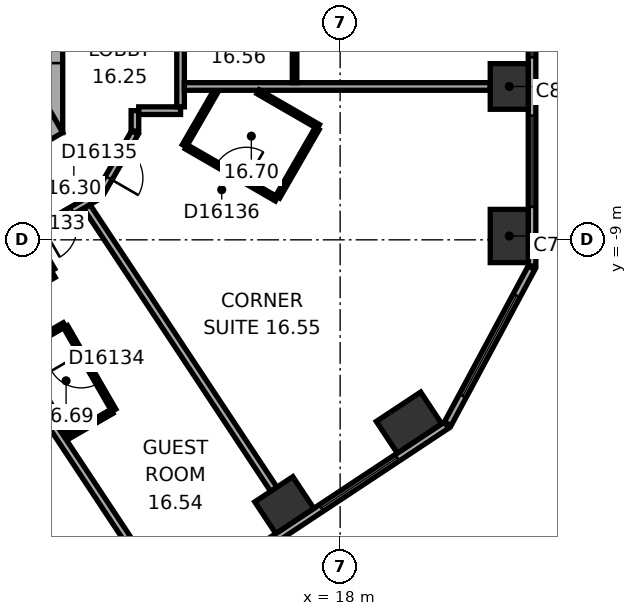
"""IFC4 building model, lengths in metres.
Left out: names, types, materials, properties, quantities, classifications, styles, units other than length and angle.
Written with IfcOpenShell. Run it as: python <this file> out.ifc"""

import sys

from ifc_helpers import new_model, si_unit, direction, frame, frame_2d, origin, origin_2d, place, context, subcontext, project, spatial, rectangle, extrude, element, fill, save


model = new_model("IFC4")
c1 = context("Model", 3, precision=1e-05, world=origin(), true_north=direction((0.0, 1.0)))
c2 = subcontext(c1, "Body", "Model", "MODEL_VIEW")
j1 = project(units=[si_unit("LENGTHUNIT", "METRE"), si_unit("PLANEANGLEUNIT", "RADIAN")], contexts=[c1])
p1 = place(None, origin())
s1 = spatial("IfcSite", under=j1, at=p1, CompositionType="ELEMENT")
p2 = place(p1, origin())
s2 = spatial("IfcBuilding", under=s1, at=p2, CompositionType="ELEMENT")
p3 = place(p2, frame((0.0, 0.0, 73.7)))
s3 = spatial("IfcBuildingStorey", under=s2, at=p3, CompositionType="ELEMENT", Elevation=73.7)
p4 = place(p3, frame((22.45, -8.899, 0.0), z_axis=(0.0, 0.0, 1.0), x_axis=(0.0, 1.0, 0.0)))
e1 = element("IfcColumn", 1, at=p4, inside=s3, PredefinedType="COLUMN", context=c2, shape_type="SweptSolid", body=[
    extrude(rectangle(XDim=1.4, YDim=1.0, at=origin_2d()), origin(), (0.0, 0.0, 1.0), 3.3),
])
for number, where, z_axis, x_axis in (
    (2, (22.45, -4.965, 0.0), (0.0, 0.0, 1.0), (0.0, 1.0, 0.0)),
    (3, (16.531, -15.981, 0.0), (0.0, 0.0, 1.0), (0.834, 0.552, 0.0)),
):
    element("IfcColumn", number, at=place(p3, frame(where, z_axis=z_axis, x_axis=x_axis)), inside=s3, PredefinedType="COLUMN", context=c2, shape_type="SweptSolid", body=[
        extrude(rectangle(XDim=1.2, YDim=1.0, at=origin_2d()), origin(), (0.0, 0.0, 1.0), 3.3),
    ])
p5 = place(p3, frame((19.812, -13.809, 0.0), z_axis=(0.0, 0.0, 1.0), x_axis=(0.833885822067, 0.551936985312, 0.0)))
e4 = element("IfcColumn", 4, at=p5, inside=s3, PredefinedType="COLUMN", context=c2, shape_type="SweptSolid", body=[
    extrude(rectangle(XDim=1.4, YDim=1.0, at=origin_2d()), origin(), (0.0, 0.0, 1.0), 3.3),
])
p6 = place(p3, frame((10.1, -6.177, 0.0), z_axis=(0.0, 0.0, 1.0), x_axis=(0.0, 1.0, 0.0)))
e5 = element("IfcWall", 5, at=p6, inside=s3, PredefinedType="SHEAR", context=c2, shape_type="SweptSolid", body=[
    extrude(rectangle(XDim=12.355, YDim=1.2, at=frame_2d((6.177, 0.0))), origin(), (0.0, 0.0, 1.0), 3.3),
])
p7 = place(p6, frame((6.378, 0.0, 0.0)))
e6 = element("IfcOpeningElement", 6, at=p7, cuts=e5, PredefinedType="OPENING", context=c2, shape_type="SweptSolid", body=[
    extrude(rectangle(XDim=1.5, YDim=2.1, at=frame_2d((0.75, 1.05))), frame((0.0, 0.61, 0.0), z_axis=(0.0, -1.0, 0.0), x_axis=(1.0, 0.0, 0.0)), (0.0, 0.0, 1.0), 1.22),
])
p8 = place(p6, frame((1.828, 0.0, 0.0)))
e7 = element("IfcOpeningElement", 7, at=p8, cuts=e5, PredefinedType="OPENING", context=c2, shape_type="SweptSolid", body=[
    extrude(rectangle(XDim=1.1, YDim=2.1, at=frame_2d((0.55, 1.05))), frame((0.0, 0.61, 0.0), z_axis=(0.0, -1.0, 0.0), x_axis=(1.0, 0.0, 0.0)), (0.0, 0.0, 1.0), 1.22),
])
p9 = place(p6, frame((4.427, 0.0, 0.0)))
e8 = element("IfcOpeningElement", 8, at=p9, cuts=e5, PredefinedType="OPENING", context=c2, shape_type="SweptSolid", body=[
    extrude(rectangle(XDim=1.1, YDim=2.1, at=frame_2d((0.55, 1.05))), frame((0.0, 0.61, 0.0), z_axis=(0.0, -1.0, 0.0), x_axis=(1.0, 0.0, 0.0)), (0.0, 0.0, 1.0), 1.22),
])
p10 = place(p3, frame((-0.3, -11.836, 0.0), z_axis=(0.0, 0.0, 1.0), x_axis=(0.866021384402, 0.500006961711, 0.0)))
e9 = element("IfcWall", 9, at=p10, inside=s3, PredefinedType="SHEAR", context=c2, shape_type="SweptSolid", body=[
    extrude(rectangle(XDim=12.355, YDim=1.2, at=frame_2d((6.178, 0.0))), origin(), (0.0, 0.0, 1.0), 3.3),
])
p11 = place(p10, frame((2.828, 0.0, 0.0)))
e10 = element("IfcOpeningElement", 10, at=p11, cuts=e9, PredefinedType="OPENING", context=c2, shape_type="SweptSolid", body=[
    extrude(rectangle(XDim=0.9, YDim=2.1, at=frame_2d((0.45, 1.05))), frame((0.0, 0.61, 0.0), z_axis=(0.0, -1.0, 0.0), x_axis=(1.0, 0.0, 0.0)), (0.0, 0.0, 1.0), 1.22),
])
p12 = place(p10, frame((5.428, 0.0, 0.0)))
e11 = element("IfcOpeningElement", 11, at=p12, cuts=e9, PredefinedType="OPENING", context=c2, shape_type="SweptSolid", body=[
    extrude(rectangle(XDim=0.9, YDim=2.1, at=frame_2d((0.45, 1.05))), frame((0.0, 0.61, 0.0), z_axis=(0.0, -1.0, 0.0), x_axis=(1.0, 0.0, 0.0)), (0.0, 0.0, 1.0), 1.22),
])
p13 = place(p10, frame((7.928, 0.0, 0.0)))
e12 = element("IfcOpeningElement", 12, at=p13, cuts=e9, PredefinedType="OPENING", context=c2, shape_type="SweptSolid", body=[
    extrude(rectangle(XDim=1.1, YDim=2.1, at=frame_2d((0.55, 1.05))), frame((0.0, 0.61, 0.0), z_axis=(0.0, -1.0, 0.0), x_axis=(1.0, 0.0, 0.0)), (0.0, 0.0, 1.0), 1.22),
])
p14 = place(p3, frame((23.05, -9.687, 0.0), z_axis=(0.0, 0.0, 1.0), x_axis=(0.0, 1.0, 0.0)))
e13 = element("IfcWall", 13, at=p14, inside=s3, PredefinedType="STANDARD", context=c2, shape_type="SweptSolid", body=[
    extrude(rectangle(XDim=21.246, YDim=0.2, at=frame_2d((10.623, 0.0))), origin(), (0.0, 0.0, 1.0), 3.3),
])
p15 = place(p14, frame((1.555, 0.0, 0.8)))
e14 = element("IfcOpeningElement", 14, at=p15, cuts=e13, PredefinedType="OPENING", context=c2, shape_type="SweptSolid", body=[
    extrude(rectangle(XDim=2.4, YDim=1.7, at=frame_2d((1.2, 0.85))), frame((0.0, 0.11, 0.0), z_axis=(0.0, -1.0, 0.0), x_axis=(1.0, 0.0, 0.0)), (0.0, 0.0, 1.0), 0.22),
])
p16 = place(p14, frame((5.489, 0.0, 0.8)))
e15 = element("IfcOpeningElement", 15, at=p16, cuts=e13, PredefinedType="OPENING", context=c2, shape_type="SweptSolid", body=[
    extrude(rectangle(XDim=2.4, YDim=1.7, at=frame_2d((1.2, 0.85))), frame((0.0, 0.11, 0.0), z_axis=(0.0, -1.0, 0.0), x_axis=(1.0, 0.0, 0.0)), (0.0, 0.0, 1.0), 0.22),
])
p17 = place(p14, frame((9.424, 0.0, 0.8)))
e16 = element("IfcOpeningElement", 16, at=p17, cuts=e13, PredefinedType="OPENING", context=c2, shape_type="SweptSolid", body=[
    extrude(rectangle(XDim=2.4, YDim=1.7, at=frame_2d((1.2, 0.85))), frame((0.0, 0.11, 0.0), z_axis=(0.0, -1.0, 0.0), x_axis=(1.0, 0.0, 0.0)), (0.0, 0.0, 1.0), 0.22),
])
p18 = place(p14, frame((13.358, 0.0, 0.8)))
e17 = element("IfcOpeningElement", 17, at=p18, cuts=e13, PredefinedType="OPENING", context=c2, shape_type="SweptSolid", body=[
    extrude(rectangle(XDim=2.4, YDim=1.7, at=frame_2d((1.2, 0.85))), frame((0.0, 0.11, 0.0), z_axis=(0.0, -1.0, 0.0), x_axis=(1.0, 0.0, 0.0)), (0.0, 0.0, 1.0), 0.22),
])
p19 = place(p14, frame((17.293, 0.0, 0.8)))
e18 = element("IfcOpeningElement", 18, at=p19, cuts=e13, PredefinedType="OPENING", context=c2, shape_type="SweptSolid", body=[
    extrude(rectangle(XDim=2.4, YDim=1.7, at=frame_2d((1.2, 0.85))), frame((0.0, 0.11, 0.0), z_axis=(0.0, -1.0, 0.0), x_axis=(1.0, 0.0, 0.0)), (0.0, 0.0, 1.0), 0.22),
])
p20 = place(p3, frame((3.083, -25.601, 0.0), z_axis=(0.0, 0.0, 1.0), x_axis=(0.833884295743, 0.551939291329, 0.0)))
e19 = element("IfcWall", 19, at=p20, inside=s3, PredefinedType="STANDARD", context=c2, shape_type="SweptSolid", body=[
    extrude(rectangle(XDim=21.246, YDim=0.2, at=frame_2d((10.623, 0.0))), origin(), (0.0, 0.0, 1.0), 3.3),
])
p21 = place(p20, frame((1.553, 0.0, 0.8)))
e20 = element("IfcOpeningElement", 20, at=p21, cuts=e19, PredefinedType="OPENING", context=c2, shape_type="SweptSolid", body=[
    extrude(rectangle(XDim=2.4, YDim=1.7, at=frame_2d((1.2, 0.85))), frame((0.0, 0.11, 0.0), z_axis=(0.0, -1.0, 0.0), x_axis=(1.0, 0.0, 0.0)), (0.0, 0.0, 1.0), 0.22),
])
p22 = place(p20, frame((5.488, 0.0, 0.8)))
e21 = element("IfcOpeningElement", 21, at=p22, cuts=e19, PredefinedType="OPENING", context=c2, shape_type="SweptSolid", body=[
    extrude(rectangle(XDim=2.4, YDim=1.7, at=frame_2d((1.2, 0.85))), frame((0.0, 0.11, 0.0), z_axis=(0.0, -1.0, 0.0), x_axis=(1.0, 0.0, 0.0)), (0.0, 0.0, 1.0), 0.22),
])
p23 = place(p20, frame((9.422, 0.0, 0.8)))
e22 = element("IfcOpeningElement", 22, at=p23, cuts=e19, PredefinedType="OPENING", context=c2, shape_type="SweptSolid", body=[
    extrude(rectangle(XDim=2.4, YDim=1.7, at=frame_2d((1.2, 0.85))), frame((0.0, 0.11, 0.0), z_axis=(0.0, -1.0, 0.0), x_axis=(1.0, 0.0, 0.0)), (0.0, 0.0, 1.0), 0.22),
])
p24 = place(p20, frame((13.357, 0.0, 0.8)))
e23 = element("IfcOpeningElement", 23, at=p24, cuts=e19, PredefinedType="OPENING", context=c2, shape_type="SweptSolid", body=[
    extrude(rectangle(XDim=2.4, YDim=1.7, at=frame_2d((1.2, 0.85))), frame((0.0, 0.11, 0.0), z_axis=(0.0, -1.0, 0.0), x_axis=(1.0, 0.0, 0.0)), (0.0, 0.0, 1.0), 0.22),
])
p25 = place(p20, frame((17.291, 0.0, 0.8)))
e24 = element("IfcOpeningElement", 24, at=p25, cuts=e19, PredefinedType="OPENING", context=c2, shape_type="SweptSolid", body=[
    extrude(rectangle(XDim=2.4, YDim=1.7, at=frame_2d((1.2, 0.85))), frame((0.0, 0.11, 0.0), z_axis=(0.0, -1.0, 0.0), x_axis=(1.0, 0.0, 0.0)), (0.0, 0.0, 1.0), 0.22),
])
p26 = place(p3, frame((20.833, -13.839, 0.0), z_axis=(0.0, 0.0, 1.0), x_axis=(0.473321668581, 0.880889662813, 0.0)))
e25 = element("IfcWall", 25, at=p26, inside=s3, PredefinedType="STANDARD", context=c2, shape_type="SweptSolid", body=[
    extrude(rectangle(XDim=4.66, YDim=0.2, at=frame_2d((2.33, 0.0))), origin(), (0.0, 0.0, 1.0), 3.3),
])
p27 = place(p26, frame((0.83, 0.0, 0.8)))
e26 = element("IfcOpeningElement", 26, at=p27, cuts=e25, PredefinedType="OPENING", context=c2, shape_type="SweptSolid", body=[
    extrude(rectangle(XDim=3.0, YDim=1.7, at=frame_2d((1.5, 0.85))), frame((0.0, 0.11, 0.0), z_axis=(0.0, -1.0, 0.0), x_axis=(1.0, 0.0, 0.0)), (0.0, 0.0, 1.0), 0.22),
])
p28 = place(p3, frame((7.419, -11.653, 0.0), z_axis=(0.0, 0.0, 1.0), x_axis=(0.866038154057, 0.49997791523, 0.0)))
e27 = element("IfcWall", 27, at=p28, inside=s3, PredefinedType="PARTITIONING", context=c2, shape_type="SweptSolid", body=[
    extrude(rectangle(XDim=3.502, YDim=0.2, at=frame_2d((1.751, 0.0))), origin(), (0.0, 0.0, 1.0), 2.95),
])
p29 = place(p3, frame((9.532, -11.934, 0.0), z_axis=(0.0, 0.0, 1.0), x_axis=(0.866034573852, 0.49998411664, 0.0)))
e28 = element("IfcWall", 28, at=p29, inside=s3, PredefinedType="PARTITIONING", context=c2, shape_type="SweptSolid", body=[
    extrude(rectangle(XDim=1.4, YDim=0.12, at=frame_2d((0.7, 0.0))), origin(), (0.0, 0.0, 1.0), 2.95),
])
p30 = place(p3, frame((9.852, -8.861, 0.0), z_axis=(0.0, 0.0, 1.0), x_axis=(0.866013291437, 0.500020978615, 0.0)))
e29 = element("IfcWall", 29, at=p30, inside=s3, PredefinedType="PARTITIONING", context=c2, shape_type="SweptSolid", body=[
    extrude(rectangle(XDim=2.077, YDim=0.2, at=frame_2d((1.038, 0.0))), origin(), (0.0, 0.0, 1.0), 2.95),
])
p31 = place(p30, frame((0.372, 0.0, 0.0)))
e30 = element("IfcOpeningElement", 30, at=p31, cuts=e29, PredefinedType="OPENING", context=c2, shape_type="SweptSolid", body=[
    extrude(rectangle(XDim=0.9, YDim=2.1, at=frame_2d((0.45, 1.05))), frame((0.0, 0.11, 0.0), z_axis=(0.0, -1.0, 0.0), x_axis=(1.0, 0.0, 0.0)), (0.0, 0.0, 1.0), 0.22),
])
p32 = place(p3, frame((10.402, -9.815, 0.0), z_axis=(0.0, 0.0, 1.0), x_axis=(-0.499968756647, 0.866043441391, 0.0)))
e31 = element("IfcWall", 31, at=p32, inside=s3, PredefinedType="PARTITIONING", context=c2, shape_type="SweptSolid", body=[
    extrude(rectangle(XDim=1.001, YDim=0.2, at=frame_2d((0.5, 0.0))), origin(), (0.0, 0.0, 1.0), 2.95),
])
p33 = place(p3, frame((10.775, -11.286, 0.0), z_axis=(0.0, 0.0, 1.0), x_axis=(0.500046963369, -0.865998287773, 0.0)))
e32 = element("IfcWall", 32, at=p33, inside=s3, PredefinedType="PARTITIONING", context=c2, shape_type="SweptSolid", body=[
    extrude(rectangle(XDim=2.54, YDim=0.12, at=frame_2d((1.27, 0.0))), origin(), (0.0, 0.0, 1.0), 2.95),
])
p34 = place(p33, frame((0.82, 0.0, 0.0)))
e33 = element("IfcOpeningElement", 33, at=p34, cuts=e32, PredefinedType="OPENING", context=c2, shape_type="SweptSolid", body=[
    extrude(rectangle(XDim=0.9, YDim=2.1, at=frame_2d((0.45, 1.05))), frame((0.0, 0.07, 0.0), z_axis=(0.0, -1.0, 0.0), x_axis=(1.0, 0.0, 0.0)), (0.0, 0.0, 1.0), 0.14),
])
p35 = place(p3, frame((10.833, -14.185, 0.0), z_axis=(0.0, 0.0, 1.0), x_axis=(-0.500005339912, 0.866022320763, 0.0)))
e34 = element("IfcWall", 34, at=p35, inside=s3, PredefinedType="PARTITIONING", context=c2, shape_type="SweptSolid", body=[
    extrude(rectangle(XDim=2.54, YDim=0.12, at=frame_2d((1.27, 0.0))), origin(), (0.0, 0.0, 1.0), 2.95),
])
p36 = place(p3, frame((11.67, -7.788, 0.0), z_axis=(0.0, 0.0, 1.0), x_axis=(0.500063286585, 0.865988862174, 0.0)))
e35 = element("IfcWall", 35, at=p36, inside=s3, PredefinedType="PARTITIONING", context=c2, shape_type="SweptSolid", body=[
    extrude(rectangle(XDim=1.86, YDim=0.2, at=frame_2d((0.93, 0.0))), origin(), (0.0, 0.0, 1.0), 2.95),
])
p37 = place(p36, frame((0.48, 0.0, 0.0)))
e36 = element("IfcOpeningElement", 36, at=p37, cuts=e35, PredefinedType="OPENING", context=c2, shape_type="SweptSolid", body=[
    extrude(rectangle(XDim=0.9, YDim=2.1, at=frame_2d((0.45, 1.05))), frame((0.0, 0.11, 0.0), z_axis=(0.0, -1.0, 0.0), x_axis=(1.0, 0.0, 0.0)), (0.0, 0.0, 1.0), 0.22),
])
p38 = place(p3, frame((11.993, -13.515, 0.0), z_axis=(0.0, 0.0, 1.0), x_axis=(-0.865956862152, -0.500118698802, 0.0)))
e37 = element("IfcWall", 37, at=p38, inside=s3, PredefinedType="PARTITIONING", context=c2, shape_type="SweptSolid", body=[
    extrude(rectangle(XDim=1.28, YDim=0.12, at=frame_2d((0.64, 0.0))), origin(), (0.0, 0.0, 1.0), 2.95),
])
p39 = place(p3, frame((12.6, -6.138, 0.0), z_axis=(0.0, 0.0, 1.0), x_axis=(0.0, 1.0, 0.0)))
e38 = element("IfcWall", 38, at=p39, inside=s3, PredefinedType="PARTITIONING", context=c2, shape_type="SweptSolid", body=[
    extrude(rectangle(XDim=0.537, YDim=0.2, at=frame_2d((0.268, 0.0))), origin(), (0.0, 0.0, 1.0), 2.95),
])
p40 = place(p3, frame((12.7, -5.601, 0.0), z_axis=(0.0, 0.0, 1.0), x_axis=(1.0, 0.0, 0.0)))
e39 = element("IfcWall", 39, at=p40, inside=s3, PredefinedType="PARTITIONING", context=c2, shape_type="SweptSolid", body=[
    extrude(rectangle(XDim=1.101, YDim=0.2, at=frame_2d((0.551, 0.0))), origin(), (0.0, 0.0, 1.0), 2.95),
])
p41 = place(p3, frame((12.974, -17.735, 0.0), z_axis=(0.0, 0.0, 1.0), x_axis=(-0.55192625685, 0.833892922982, 0.0)))
e40 = element("IfcWall", 40, at=p41, inside=s3, PredefinedType="PARTITIONING", context=c2, shape_type="SweptSolid", body=[
    extrude(rectangle(XDim=7.95, YDim=0.2, at=frame_2d((3.975, 0.0))), origin(), (0.0, 0.0, 1.0), 2.95),
])
p42 = place(p3, frame((13.801, -5.501, 0.0), z_axis=(0.0, 0.0, 1.0), x_axis=(0.0, 1.0, 0.0)))
e41 = element("IfcWall", 41, at=p42, inside=s3, PredefinedType="PARTITIONING", context=c2, shape_type="SweptSolid", body=[
    extrude(rectangle(XDim=5.702, YDim=0.2, at=frame_2d((2.851, 0.0))), origin(), (0.0, 0.0, 1.0), 2.95),
])
p43 = place(p42, frame((3.296, 0.0, 0.0)))
e42 = element("IfcOpeningElement", 42, at=p43, cuts=e41, PredefinedType="OPENING", context=c2, shape_type="SweptSolid", body=[
    extrude(rectangle(XDim=0.9, YDim=2.1, at=frame_2d((0.45, 1.05))), frame((0.0, 0.11, 0.0), z_axis=(0.0, -1.0, 0.0), x_axis=(1.0, 0.0, 0.0)), (0.0, 0.0, 1.0), 0.22),
])
p44 = place(p3, frame((13.901, -6.524, 0.0), z_axis=(0.0, 0.0, 1.0), x_axis=(0.499964162598, 0.86604609353, 0.0)))
e43 = element("IfcWall", 43, at=p44, inside=s3, PredefinedType="PARTITIONING", context=c2, shape_type="SweptSolid", body=[
    extrude(rectangle(XDim=1.661, YDim=0.12, at=frame_2d((0.831, 0.0))), origin(), (0.0, 0.0, 1.0), 2.95),
])
p45 = place(p3, frame((13.901, -4.965, 0.0), z_axis=(0.0, 0.0, 1.0), x_axis=(1.0, 0.0, 0.0)))
e44 = element("IfcWall", 44, at=p45, inside=s3, PredefinedType="PARTITIONING", context=c2, shape_type="SweptSolid", body=[
    extrude(rectangle(XDim=8.049, YDim=0.2, at=frame_2d((4.024, 0.0))), origin(), (0.0, 0.0, 1.0), 2.95),
])
p46 = place(p3, frame((15.841, -5.104, 0.0), z_axis=(0.0, 0.0, 1.0), x_axis=(0.866025591402, -0.499999675036, 0.0)))
e45 = element("IfcWall", 45, at=p46, inside=s3, PredefinedType="PARTITIONING", context=c2, shape_type="SweptSolid", body=[
    extrude(rectangle(XDim=1.83, YDim=0.12, at=frame_2d((0.915, 0.0))), origin(), (0.0, 0.0, 1.0), 2.95),
])
p47 = place(p3, frame((16.255, -15.564, 0.0), z_axis=(0.0, 0.0, 1.0), x_axis=(-0.55192208744, 0.833895682562, 0.0)))
e46 = element("IfcWall", 46, at=p47, inside=s3, PredefinedType="PARTITIONING", context=c2, shape_type="SweptSolid", body=[
    extrude(rectangle(XDim=8.913, YDim=0.2, at=frame_2d((4.457, 0.0))), origin(), (0.0, 0.0, 1.0), 2.15),
])
p48 = place(p3, frame((16.326, -7.925, 0.0), z_axis=(0.0, 0.0, 1.0), x_axis=(-0.865997131366, 0.500048966069, 0.0)))
e47 = element("IfcWall", 47, at=p48, inside=s3, PredefinedType="PARTITIONING", context=c2, shape_type="SweptSolid", body=[
    extrude(rectangle(XDim=2.74, YDim=0.12, at=frame_2d((1.37, 0.0))), origin(), (0.0, 0.0, 1.0), 2.95),
])
p49 = place(p48, frame((0.92, 0.0, 0.0)))
e48 = element("IfcOpeningElement", 48, at=p49, cuts=e47, PredefinedType="OPENING", context=c2, shape_type="SweptSolid", body=[
    extrude(rectangle(XDim=0.9, YDim=2.1, at=frame_2d((0.45, 1.05))), frame((0.0, 0.07, 0.0), z_axis=(0.0, -1.0, 0.0), x_axis=(1.0, 0.0, 0.0)), (0.0, 0.0, 1.0), 0.14),
])
p50 = place(p3, frame((16.801, -2.59, 0.0), z_axis=(0.0, 0.0, 1.0), x_axis=(0.0, -1.0, 0.0)))
e49 = element("IfcWall", 49, at=p50, inside=s3, PredefinedType="PARTITIONING", context=c2, shape_type="SweptSolid", body=[
    extrude(rectangle(XDim=2.274, YDim=0.12, at=frame_2d((1.137, 0.0))), origin(), (0.0, 0.0, 1.0), 2.95),
])
p51 = place(p3, frame((17.396, -6.071, 0.0), z_axis=(0.0, 0.0, 1.0), x_axis=(-0.500027264788, -0.866009661879, 0.0)))
e50 = element("IfcWall", 50, at=p51, inside=s3, PredefinedType="PARTITIONING", context=c2, shape_type="SweptSolid", body=[
    extrude(rectangle(XDim=2.08, YDim=0.12, at=frame_2d((1.04, 0.0))), origin(), (0.0, 0.0, 1.0), 2.95),
])
p52 = place(p15, origin())
e51 = element("IfcWindow", 51, at=p52, inside=s3, PartitioningType="SINGLE_PANEL", PredefinedType="WINDOW", context=c2, shape_type="SweptSolid", body=[
    extrude(rectangle(XDim=2.4, YDim=1.7, at=frame_2d((1.2, 0.85))), frame((0.0, 0.03, 0.0), z_axis=(0.0, -1.0, 0.0), x_axis=(1.0, 0.0, 0.0)), (0.0, 0.0, 1.0), 0.06),
])
fill(e14, e51)
p53 = place(p16, origin())
e52 = element("IfcWindow", 52, at=p53, inside=s3, PartitioningType="SINGLE_PANEL", PredefinedType="WINDOW", context=c2, shape_type="SweptSolid", body=[
    extrude(rectangle(XDim=2.4, YDim=1.7, at=frame_2d((1.2, 0.85))), frame((0.0, 0.03, 0.0), z_axis=(0.0, -1.0, 0.0), x_axis=(1.0, 0.0, 0.0)), (0.0, 0.0, 1.0), 0.06),
])
fill(e15, e52)
p54 = place(p25, origin())
e53 = element("IfcWindow", 53, at=p54, inside=s3, PartitioningType="SINGLE_PANEL", PredefinedType="WINDOW", context=c2, shape_type="SweptSolid", body=[
    extrude(rectangle(XDim=2.4, YDim=1.7, at=frame_2d((1.2, 0.85))), frame((0.0, 0.03, 0.0), z_axis=(0.0, -1.0, 0.0), x_axis=(1.0, 0.0, 0.0)), (0.0, 0.0, 1.0), 0.06),
])
fill(e24, e53)
p55 = place(p27, origin())
e54 = element("IfcWindow", 54, at=p55, inside=s3, PartitioningType="SINGLE_PANEL", PredefinedType="WINDOW", context=c2, shape_type="SweptSolid", body=[
    extrude(rectangle(XDim=3.0, YDim=1.7, at=frame_2d((1.5, 0.85))), frame((0.0, 0.03, 0.0), z_axis=(0.0, -1.0, 0.0), x_axis=(1.0, 0.0, 0.0)), (0.0, 0.0, 1.0), 0.06),
])
fill(e26, e54)
p56 = place(p31, origin())
e55 = element("IfcDoor", 55, at=p56, inside=s3, OperationType="SINGLE_SWING_LEFT", PredefinedType="DOOR", context=c2, shape_type="SweptSolid", body=[
    extrude(rectangle(XDim=0.9, YDim=2.1, at=frame_2d((0.45, 1.05))), frame((0.0, 0.025, 0.0), z_axis=(0.0, -1.0, 0.0), x_axis=(1.0, 0.0, 0.0)), (0.0, 0.0, 1.0), 0.05),
])
fill(e30, e55)
p57 = place(p34, origin())
e56 = element("IfcDoor", 56, at=p57, inside=s3, OperationType="SINGLE_SWING_LEFT", PredefinedType="DOOR", context=c2, shape_type="SweptSolid", body=[
    extrude(rectangle(XDim=0.9, YDim=2.1, at=frame_2d((0.45, 1.05))), frame((0.0, 0.025, 0.0), z_axis=(0.0, -1.0, 0.0), x_axis=(1.0, 0.0, 0.0)), (0.0, 0.0, 1.0), 0.05),
])
fill(e33, e56)
p58 = place(p37, origin())
e57 = element("IfcDoor", 57, at=p58, inside=s3, OperationType="SINGLE_SWING_LEFT", PredefinedType="DOOR", context=c2, shape_type="SweptSolid", body=[
    extrude(rectangle(XDim=0.9, YDim=2.1, at=frame_2d((0.45, 1.05))), frame((0.0, 0.025, 0.0), z_axis=(0.0, -1.0, 0.0), x_axis=(1.0, 0.0, 0.0)), (0.0, 0.0, 1.0), 0.05),
])
fill(e36, e57)
p59 = place(p49, origin())
e58 = element("IfcDoor", 58, at=p59, inside=s3, OperationType="SINGLE_SWING_LEFT", PredefinedType="DOOR", context=c2, shape_type="SweptSolid", body=[
    extrude(rectangle(XDim=0.9, YDim=2.1, at=frame_2d((0.45, 1.05))), frame((0.0, 0.025, 0.0), z_axis=(0.0, -1.0, 0.0), x_axis=(1.0, 0.0, 0.0)), (0.0, 0.0, 1.0), 0.05),
])
fill(e48, e58)
save(model, sys.argv[1])
